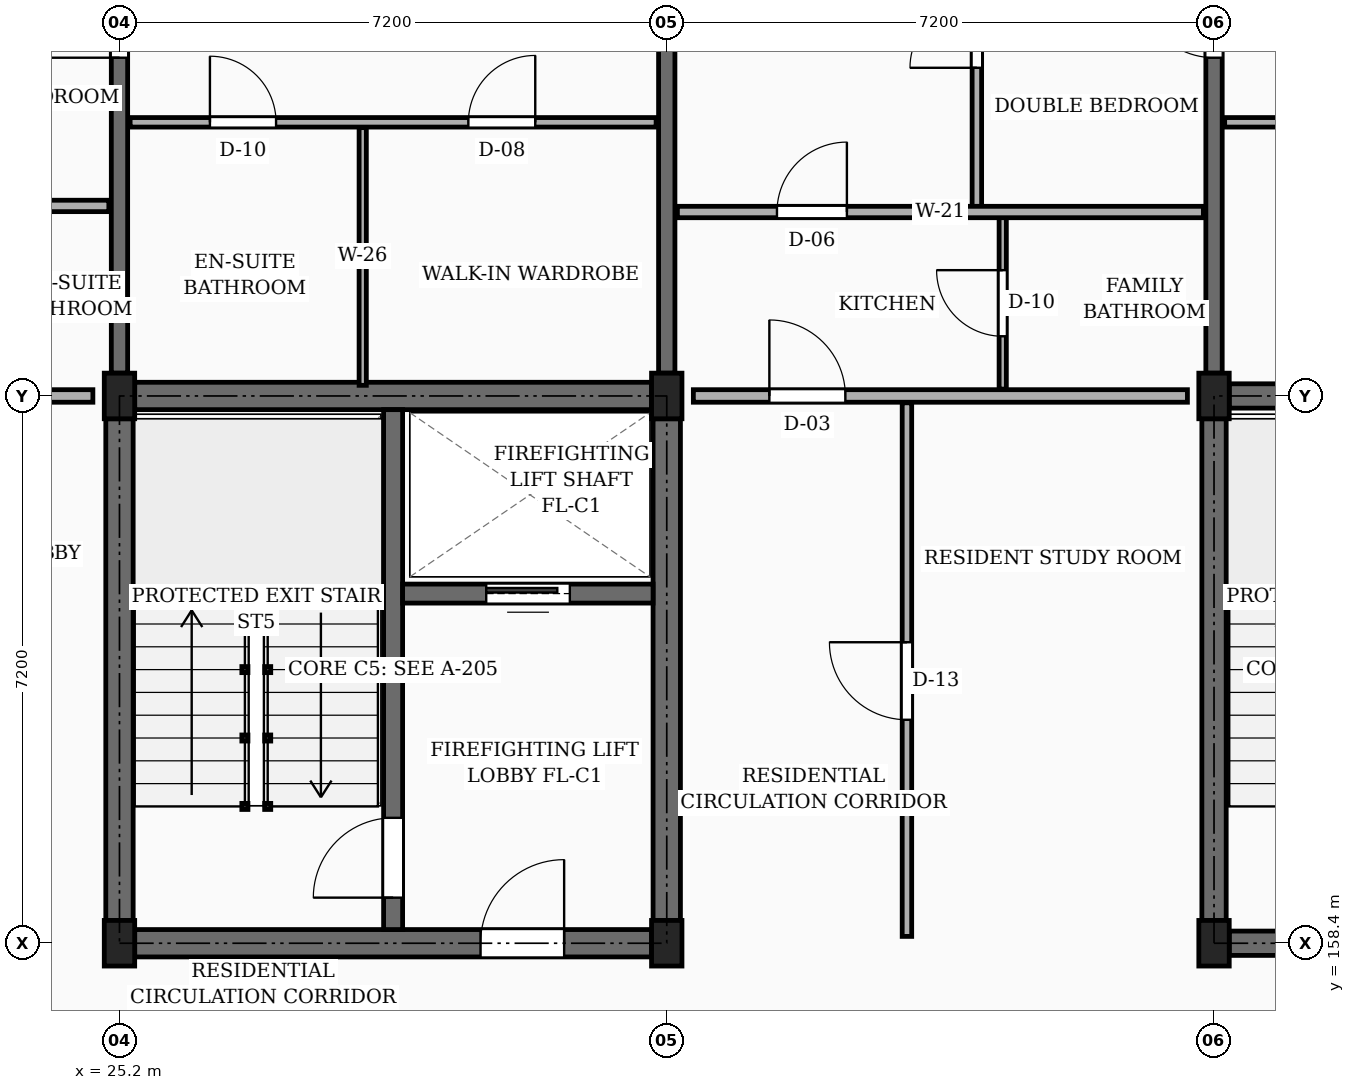
"""IFC4 building model, lengths in metres.
Left out: names, types, materials, properties, quantities, classifications, styles, units other than length and angle.
Written with IfcOpenShell. Run it as: python <this file> out.ifc"""

import sys

from ifc_helpers import new_model, si_unit, direction, frame, frame_2d, origin, origin_2d, place, context, subcontext, project, spatial, rectangle, extrude, element, fill, save


model = new_model("IFC4")
c1 = context("Model", 3, precision=1e-05, world=origin(), true_north=direction((0.0, 1.0)))
c2 = subcontext(c1, "Body", "Model", "MODEL_VIEW")
j1 = project(units=[si_unit("LENGTHUNIT", "METRE"), si_unit("PLANEANGLEUNIT", "RADIAN")], contexts=[c1])
p1 = place(None, origin())
s1 = spatial("IfcSite", under=j1, at=p1, CompositionType="ELEMENT")
p2 = place(p1, origin())
s2 = spatial("IfcBuilding", under=s1, at=p2, CompositionType="ELEMENT")
p3 = place(p2, frame((0.0, 0.0, 32.85)))
s3 = spatial("IfcBuildingStorey", under=s2, at=p3, CompositionType="ELEMENT", Elevation=32.85)
for number, where, z_axis, x_axis in (
    (1, (25.2, 158.4, 0.0), (0.0, 0.0, 1.0), (1.0, 0.0, 0.0)),
    (2, (25.2, 165.6, 0.0), (0.0, 0.0, 1.0), (1.0, 0.0, 0.0)),
    (3, (32.4, 158.4, 0.0), (0.0, 0.0, 1.0), (1.0, 0.0, 0.0)),
    (4, (32.4, 165.6, 0.0), (0.0, 0.0, 1.0), (1.0, 0.0, 0.0)),
    (5, (39.6, 158.4, 0.0), (0.0, 0.0, 1.0), (1.0, 0.0, 0.0)),
    (6, (39.6, 165.6, 0.0), (0.0, 0.0, 1.0), (1.0, 0.0, 0.0)),
):
    element("IfcColumn", number, at=place(p3, frame(where, z_axis=z_axis, x_axis=x_axis)), inside=s3, PredefinedType="COLUMN", context=c2, shape_type="SweptSolid", body=[
        extrude(rectangle(XDim=0.4, YDim=0.6, at=origin_2d()), origin(), (0.0, 0.0, 1.0), 3.15),
    ])
p4 = place(p3, frame((25.2, 165.9, 0.0), z_axis=(0.0, 0.0, 1.0), x_axis=(0.0, 1.0, 0.0)))
e7 = element("IfcWall", 7, at=p4, inside=s3, PredefinedType="SOLIDWALL", context=c2, shape_type="SweptSolid", body=[
    extrude(rectangle(XDim=6.65, YDim=0.215, at=frame_2d((3.325, 0.0))), origin(), (0.0, 0.0, 1.0), 2.185),
])
p5 = place(p4, frame((4.15, 0.0, 0.0)))
e8 = element("IfcOpeningElement", 8, at=p5, cuts=e7, PredefinedType="OPENING", context=c2, shape_type="SweptSolid", body=[
    extrude(rectangle(XDim=0.98, YDim=2.12, at=frame_2d((0.49, 1.06))), frame((0.0, 0.118, 0.0), z_axis=(0.0, -1.0, 0.0), x_axis=(1.0, 0.0, 0.0)), (0.0, 0.0, 1.0), 0.235),
])
p6 = place(p3, frame((32.4, 165.9, 0.0), z_axis=(0.0, 0.0, 1.0), x_axis=(0.0, 1.0, 0.0)))
e9 = element("IfcWall", 9, at=p6, inside=s3, PredefinedType="SOLIDWALL", context=c2, shape_type="SweptSolid", body=[
    extrude(rectangle(XDim=6.65, YDim=0.215, at=frame_2d((3.325, 0.0))), origin(), (0.0, 0.0, 1.0), 2.185),
])
p7 = place(p3, frame((39.6, 165.9, 0.0), z_axis=(0.0, 0.0, 1.0), x_axis=(0.0, 1.0, 0.0)))
e10 = element("IfcWall", 10, at=p7, inside=s3, PredefinedType="SOLIDWALL", context=c2, shape_type="SweptSolid", body=[
    extrude(rectangle(XDim=6.65, YDim=0.215, at=frame_2d((3.325, 0.0))), origin(), (0.0, 0.0, 1.0), 2.185),
])
p8 = place(p7, frame((4.15, 0.0, 0.0)))
e11 = element("IfcOpeningElement", 11, at=p8, cuts=e10, PredefinedType="OPENING", context=c2, shape_type="SweptSolid", body=[
    extrude(rectangle(XDim=0.98, YDim=2.12, at=frame_2d((0.49, 1.06))), frame((0.0, 0.118, 0.0), z_axis=(0.0, -1.0, 0.0), x_axis=(1.0, 0.0, 0.0)), (0.0, 0.0, 1.0), 0.235),
])
p9 = place(p3, frame((25.2, 158.7, 0.0), z_axis=(0.0, 0.0, 1.0), x_axis=(0.0, 1.0, 0.0)))
e12 = element("IfcWall", 12, at=p9, inside=s3, PredefinedType="SHEAR", context=c2, shape_type="SweptSolid", body=[
    extrude(rectangle(XDim=6.6, YDim=0.36, at=frame_2d((3.3, 0.0))), origin(), (0.0, 0.0, 1.0), 2.885),
])
p10 = place(p3, frame((25.4, 165.6, 0.0), z_axis=(0.0, 0.0, 1.0), x_axis=(1.0, 0.0, 0.0)))
e13 = element("IfcWall", 13, at=p10, inside=s3, PredefinedType="SHEAR", context=c2, shape_type="SweptSolid", body=[
    extrude(rectangle(XDim=6.8, YDim=0.36, at=frame_2d((3.4, 0.0))), origin(), (0.0, 0.0, 1.0), 2.885),
])
p11 = place(p3, frame((32.4, 158.7, 0.0), z_axis=(0.0, 0.0, 1.0), x_axis=(0.0, 1.0, 0.0)))
e14 = element("IfcWall", 14, at=p11, inside=s3, PredefinedType="SHEAR", context=c2, shape_type="SweptSolid", body=[
    extrude(rectangle(XDim=6.6, YDim=0.36, at=frame_2d((3.3, 0.0))), origin(), (0.0, 0.0, 1.0), 2.885),
])
p12 = place(p3, frame((25.4, 158.4, 0.0), z_axis=(0.0, 0.0, 1.0), x_axis=(1.0, 0.0, 0.0)))
e15 = element("IfcWall", 15, at=p12, inside=s3, PredefinedType="SHEAR", context=c2, shape_type="SweptSolid", body=[
    extrude(rectangle(XDim=6.8, YDim=0.36, at=frame_2d((3.4, 0.0))), origin(), (0.0, 0.0, 1.0), 2.885),
])
p13 = place(p12, frame((4.55, 0.0, 0.0)))
e16 = element("IfcOpeningElement", 16, at=p13, cuts=e15, PredefinedType="OPENING", context=c2, shape_type="SweptSolid", body=[
    extrude(rectangle(XDim=1.1, YDim=2.15, at=frame_2d((0.55, 1.075))), frame((0.0, 0.19, 0.0), z_axis=(0.0, -1.0, 0.0), x_axis=(1.0, 0.0, 0.0)), (0.0, 0.0, 1.0), 0.38),
])
p14 = place(p3, frame((28.8, 158.58, 0.0), z_axis=(0.0, 0.0, 1.0), x_axis=(0.0, 1.0, 0.0)))
e17 = element("IfcWall", 17, at=p14, inside=s3, PredefinedType="SHEAR", context=c2, shape_type="SweptSolid", body=[
    extrude(rectangle(XDim=6.84, YDim=0.25, at=frame_2d((3.42, 0.0))), origin(), (0.0, 0.0, 1.0), 2.885),
])
p15 = place(p14, frame((0.42, 0.0, 0.0)))
e18 = element("IfcOpeningElement", 18, at=p15, cuts=e17, PredefinedType="OPENING", context=c2, shape_type="SweptSolid", body=[
    extrude(rectangle(XDim=1.05, YDim=2.15, at=frame_2d((0.525, 1.075))), frame((0.0, 0.135, 0.0), z_axis=(0.0, -1.0, 0.0), x_axis=(1.0, 0.0, 0.0)), (0.0, 0.0, 1.0), 0.27),
])
p16 = place(p3, frame((28.925, 163.0, 0.0), z_axis=(0.0, 0.0, 1.0), x_axis=(1.0, 0.0, 0.0)))
e19 = element("IfcWall", 19, at=p16, inside=s3, PredefinedType="SHEAR", context=c2, shape_type="SweptSolid", body=[
    extrude(rectangle(XDim=3.295, YDim=0.25, at=frame_2d((1.647, 0.0))), origin(), (0.0, 0.0, 1.0), 2.885),
])
p17 = place(p16, frame((1.1, 0.0, 0.0)))
e20 = element("IfcOpeningElement", 20, at=p17, cuts=e19, PredefinedType="OPENING", context=c2, shape_type="SweptSolid", body=[
    extrude(rectangle(XDim=1.1, YDim=2.2, at=frame_2d((0.55, 1.1))), frame((0.0, 0.135, 0.0), z_axis=(0.0, -1.0, 0.0), x_axis=(1.0, 0.0, 0.0)), (0.0, 0.0, 1.0), 0.27),
])
p18 = place(p3, frame((39.6, 158.7, 0.0), z_axis=(0.0, 0.0, 1.0), x_axis=(0.0, 1.0, 0.0)))
e21 = element("IfcWall", 21, at=p18, inside=s3, PredefinedType="SHEAR", context=c2, shape_type="SweptSolid", body=[
    extrude(rectangle(XDim=6.6, YDim=0.32, at=frame_2d((3.3, 0.0))), origin(), (0.0, 0.0, 1.0), 2.885),
])
p19 = place(p3, frame((39.8, 165.6, 0.0), z_axis=(0.0, 0.0, 1.0), x_axis=(1.0, 0.0, 0.0)))
e22 = element("IfcWall", 22, at=p19, inside=s3, PredefinedType="SHEAR", context=c2, shape_type="SweptSolid", body=[
    extrude(rectangle(XDim=6.8, YDim=0.32, at=frame_2d((3.4, 0.0))), origin(), (0.0, 0.0, 1.0), 2.885),
])
p20 = place(p3, frame((39.8, 158.4, 0.0), z_axis=(0.0, 0.0, 1.0), x_axis=(1.0, 0.0, 0.0)))
e23 = element("IfcWall", 23, at=p20, inside=s3, PredefinedType="SHEAR", context=c2, shape_type="SweptSolid", body=[
    extrude(rectangle(XDim=6.8, YDim=0.32, at=frame_2d((3.4, 0.0))), origin(), (0.0, 0.0, 1.0), 2.885),
])
p21 = place(p20, frame((4.55, 0.0, 0.0)))
e24 = element("IfcOpeningElement", 24, at=p21, cuts=e23, PredefinedType="OPENING", context=c2, shape_type="SweptSolid", body=[
    extrude(rectangle(XDim=1.1, YDim=2.15, at=frame_2d((0.55, 1.075))), frame((0.0, 0.17, 0.0), z_axis=(0.0, -1.0, 0.0), x_axis=(1.0, 0.0, 0.0)), (0.0, 0.0, 1.0), 0.34),
])
p22 = place(p3, frame((18.35, 165.6, 0.0), z_axis=(0.0, 0.0, 1.0), x_axis=(1.0, 0.0, 0.0)))
e25 = element("IfcWall", 25, at=p22, inside=s3, PredefinedType="PARTITIONING", context=c2, shape_type="SweptSolid", body=[
    extrude(rectangle(XDim=6.5, YDim=0.165, at=frame_2d((3.25, 0.0))), origin(), (0.0, 0.0, 1.0), 2.32),
])
p23 = place(p22, frame((1.0, 0.0, 0.0)))
e26 = element("IfcOpeningElement", 26, at=p23, cuts=e25, PredefinedType="OPENING", context=c2, shape_type="SweptSolid", body=[
    extrude(rectangle(XDim=1.14, YDim=2.18, at=frame_2d((0.57, 1.09))), frame((0.0, 0.093, 0.0), z_axis=(0.0, -1.0, 0.0), x_axis=(1.0, 0.0, 0.0)), (0.0, 0.0, 1.0), 0.185),
])
p24 = place(p3, frame((32.75, 165.6, 0.0), z_axis=(0.0, 0.0, 1.0), x_axis=(1.0, 0.0, 0.0)))
e27 = element("IfcWall", 27, at=p24, inside=s3, PredefinedType="PARTITIONING", context=c2, shape_type="SweptSolid", body=[
    extrude(rectangle(XDim=6.5, YDim=0.165, at=frame_2d((3.25, 0.0))), origin(), (0.0, 0.0, 1.0), 2.32),
])
p25 = place(p24, frame((1.0, 0.0, 0.0)))
e28 = element("IfcOpeningElement", 28, at=p25, cuts=e27, PredefinedType="OPENING", context=c2, shape_type="SweptSolid", body=[
    extrude(rectangle(XDim=1.0, YDim=2.15, at=frame_2d((0.5, 1.075))), frame((0.0, 0.093, 0.0), z_axis=(0.0, -1.0, 0.0), x_axis=(1.0, 0.0, 0.0)), (0.0, 0.0, 1.0), 0.185),
])
p26 = place(p3, frame((18.14, 168.1, 0.0), z_axis=(0.0, 0.0, 1.0), x_axis=(1.0, 0.0, 0.0)))
e29 = element("IfcWall", 29, at=p26, inside=s3, PredefinedType="PARTITIONING", context=c2, shape_type="SweptSolid", body=[
    extrude(rectangle(XDim=6.92, YDim=0.15, at=frame_2d((3.46, 0.0))), origin(), (0.0, 0.0, 1.0), 2.32),
])
p27 = place(p26, frame((1.31, 0.0, 0.0)))
e30 = element("IfcOpeningElement", 30, at=p27, cuts=e29, PredefinedType="OPENING", context=c2, shape_type="SweptSolid", body=[
    extrude(rectangle(XDim=0.95, YDim=2.1, at=frame_2d((0.475, 1.05))), frame((0.0, 0.085, 0.0), z_axis=(0.0, -1.0, 0.0), x_axis=(1.0, 0.0, 0.0)), (0.0, 0.0, 1.0), 0.17),
])
p28 = place(p3, frame((25.34, 169.2, 0.0), z_axis=(0.0, 0.0, 1.0), x_axis=(1.0, 0.0, 0.0)))
e31 = element("IfcWall", 31, at=p28, inside=s3, PredefinedType="PARTITIONING", context=c2, shape_type="SweptSolid", body=[
    extrude(rectangle(XDim=6.92, YDim=0.125, at=frame_2d((3.46, 0.0))), origin(), (0.0, 0.0, 1.0), 2.32),
])
p29 = place(p28, frame((1.05, 0.0, 0.0)))
e32 = element("IfcOpeningElement", 32, at=p29, cuts=e31, PredefinedType="OPENING", context=c2, shape_type="SweptSolid", body=[
    extrude(rectangle(XDim=0.87, YDim=2.05, at=frame_2d((0.435, 1.025))), frame((0.0, 0.073, 0.0), z_axis=(0.0, -1.0, 0.0), x_axis=(1.0, 0.0, 0.0)), (0.0, 0.0, 1.0), 0.145),
])
p30 = place(p28, frame((4.45, 0.0, 0.0)))
e33 = element("IfcOpeningElement", 33, at=p30, cuts=e31, PredefinedType="OPENING", context=c2, shape_type="SweptSolid", body=[
    extrude(rectangle(XDim=0.88, YDim=2.08, at=frame_2d((0.44, 1.04))), frame((0.0, 0.073, 0.0), z_axis=(0.0, -1.0, 0.0), x_axis=(1.0, 0.0, 0.0)), (0.0, 0.0, 1.0), 0.145),
])
p31 = place(p3, frame((28.4, 165.74, 0.0), z_axis=(0.0, 0.0, 1.0), x_axis=(0.0, 1.0, 0.0)))
e34 = element("IfcWall", 34, at=p31, inside=s3, PredefinedType="PARTITIONING", context=c2, shape_type="SweptSolid", body=[
    extrude(rectangle(XDim=3.39, YDim=0.095, at=frame_2d((1.695, 0.0))), origin(), (0.0, 0.0, 1.0), 2.32),
])
p32 = place(p3, frame((35.56, 158.49, 0.0), z_axis=(0.0, 0.0, 1.0), x_axis=(0.0, 1.0, 0.0)))
e35 = element("IfcWall", 35, at=p32, inside=s3, PredefinedType="PARTITIONING", context=c2, shape_type="SweptSolid", body=[
    extrude(rectangle(XDim=7.02, YDim=0.125, at=frame_2d((3.51, 0.0))), origin(), (0.0, 0.0, 1.0), 2.32),
])
p33 = place(p32, frame((2.85, 0.0, 0.0)))
e36 = element("IfcOpeningElement", 36, at=p33, cuts=e35, PredefinedType="OPENING", context=c2, shape_type="SweptSolid", body=[
    extrude(rectangle(XDim=1.02, YDim=2.15, at=frame_2d((0.51, 1.075))), frame((0.0, 0.073, 0.0), z_axis=(0.0, -1.0, 0.0), x_axis=(1.0, 0.0, 0.0)), (0.0, 0.0, 1.0), 0.145),
])
p34 = place(p3, frame((36.48, 168.09, 0.0), z_axis=(0.0, 0.0, 1.0), x_axis=(0.0, 1.0, 0.0)))
e37 = element("IfcWall", 37, at=p34, inside=s3, PredefinedType="PARTITIONING", context=c2, shape_type="SweptSolid", body=[
    extrude(rectangle(XDim=4.535, YDim=0.125, at=frame_2d((2.268, 0.0))), origin(), (0.0, 0.0, 1.0), 2.32),
])
p35 = place(p34, frame((1.827, 0.0, 0.0)))
e38 = element("IfcOpeningElement", 38, at=p35, cuts=e37, PredefinedType="OPENING", context=c2, shape_type="SweptSolid", body=[
    extrude(rectangle(XDim=0.88, YDim=2.08, at=frame_2d((0.44, 1.04))), frame((0.0, 0.073, 0.0), z_axis=(0.0, -1.0, 0.0), x_axis=(1.0, 0.0, 0.0)), (0.0, 0.0, 1.0), 0.145),
])
p36 = place(p3, frame((36.82, 165.69, 0.0), z_axis=(0.0, 0.0, 1.0), x_axis=(0.0, 1.0, 0.0)))
e39 = element("IfcWall", 39, at=p36, inside=s3, PredefinedType="PARTITIONING", context=c2, shape_type="SweptSolid", body=[
    extrude(rectangle(XDim=2.26, YDim=0.095, at=frame_2d((1.13, 0.0))), origin(), (0.0, 0.0, 1.0), 2.32),
])
p37 = place(p36, frame((0.695, 0.0, 0.0)))
e40 = element("IfcOpeningElement", 40, at=p37, cuts=e39, PredefinedType="OPENING", context=c2, shape_type="SweptSolid", body=[
    extrude(rectangle(XDim=0.87, YDim=2.05, at=frame_2d((0.435, 1.025))), frame((0.0, 0.058, 0.0), z_axis=(0.0, -1.0, 0.0), x_axis=(1.0, 0.0, 0.0)), (0.0, 0.0, 1.0), 0.115),
])
p38 = place(p3, frame((32.54, 168.02, 0.0), z_axis=(0.0, 0.0, 1.0), x_axis=(1.0, 0.0, 0.0)))
e41 = element("IfcWall", 41, at=p38, inside=s3, PredefinedType="PARTITIONING", context=c2, shape_type="SweptSolid", body=[
    extrude(rectangle(XDim=6.92, YDim=0.15, at=frame_2d((3.46, 0.0))), origin(), (0.0, 0.0, 1.0), 2.32),
])
p39 = place(p38, frame((1.31, 0.0, 0.0)))
e42 = element("IfcOpeningElement", 42, at=p39, cuts=e41, PredefinedType="OPENING", context=c2, shape_type="SweptSolid", body=[
    extrude(rectangle(XDim=0.92, YDim=2.1, at=frame_2d((0.46, 1.05))), frame((0.0, 0.085, 0.0), z_axis=(0.0, -1.0, 0.0), x_axis=(1.0, 0.0, 0.0)), (0.0, 0.0, 1.0), 0.17),
])
p40 = place(p3, frame((39.74, 169.2, 0.0), z_axis=(0.0, 0.0, 1.0), x_axis=(1.0, 0.0, 0.0)))
e43 = element("IfcWall", 43, at=p40, inside=s3, PredefinedType="PARTITIONING", context=c2, shape_type="SweptSolid", body=[
    extrude(rectangle(XDim=6.92, YDim=0.125, at=frame_2d((3.46, 0.0))), origin(), (0.0, 0.0, 1.0), 2.32),
])
p41 = place(p40, frame((1.05, 0.0, 0.0)))
e44 = element("IfcOpeningElement", 44, at=p41, cuts=e43, PredefinedType="OPENING", context=c2, shape_type="SweptSolid", body=[
    extrude(rectangle(XDim=0.87, YDim=2.05, at=frame_2d((0.435, 1.025))), frame((0.0, 0.073, 0.0), z_axis=(0.0, -1.0, 0.0), x_axis=(1.0, 0.0, 0.0)), (0.0, 0.0, 1.0), 0.145),
])
p42 = place(p40, frame((4.45, 0.0, 0.0)))
e45 = element("IfcOpeningElement", 45, at=p42, cuts=e43, PredefinedType="OPENING", context=c2, shape_type="SweptSolid", body=[
    extrude(rectangle(XDim=0.88, YDim=2.08, at=frame_2d((0.44, 1.04))), frame((0.0, 0.073, 0.0), z_axis=(0.0, -1.0, 0.0), x_axis=(1.0, 0.0, 0.0)), (0.0, 0.0, 1.0), 0.145),
])
p43 = place(p13, frame((1.1, 0.0, 0.0), z_axis=(0.0, 0.0, 1.0), x_axis=(-1.0, 0.0, 0.0)))
e46 = element("IfcDoor", 46, at=p43, inside=s3, OperationType="SINGLE_SWING_RIGHT", PredefinedType="DOOR", context=c2, shape_type="SweptSolid", body=[
    extrude(rectangle(XDim=1.1, YDim=2.15, at=frame_2d((0.55, 1.075))), frame((0.0, 0.025, 0.0), z_axis=(0.0, -1.0, 0.0), x_axis=(1.0, 0.0, 0.0)), (0.0, 0.0, 1.0), 0.05),
])
fill(e16, e46)
p44 = place(p15, origin())
e47 = element("IfcDoor", 47, at=p44, inside=s3, OperationType="SINGLE_SWING_LEFT", PredefinedType="DOOR", context=c2, shape_type="SweptSolid", body=[
    extrude(rectangle(XDim=1.05, YDim=2.15, at=frame_2d((0.525, 1.075))), frame((0.0, 0.025, 0.0), z_axis=(0.0, -1.0, 0.0), x_axis=(1.0, 0.0, 0.0)), (0.0, 0.0, 1.0), 0.05),
])
fill(e18, e47)
p45 = place(p17, origin())
e48 = element("IfcDoor", 48, at=p45, inside=s3, OperationType="SLIDING_TO_LEFT", PredefinedType="DOOR", context=c2, shape_type="SweptSolid", body=[
    extrude(rectangle(XDim=1.1, YDim=2.2, at=frame_2d((0.55, 1.1))), frame((0.0, 0.025, 0.0), z_axis=(0.0, -1.0, 0.0), x_axis=(1.0, 0.0, 0.0)), (0.0, 0.0, 1.0), 0.05),
])
fill(e20, e48)
p46 = place(p25, origin())
e49 = element("IfcDoor", 49, at=p46, inside=s3, OperationType="SINGLE_SWING_LEFT", PredefinedType="DOOR", context=c2, shape_type="SweptSolid", body=[
    extrude(rectangle(XDim=1.0, YDim=2.15, at=frame_2d((0.5, 1.075))), frame((0.0, 0.025, 0.0), z_axis=(0.0, -1.0, 0.0), x_axis=(1.0, 0.0, 0.0)), (0.0, 0.0, 1.0), 0.05),
])
fill(e28, e49)
p47 = place(p29, origin())
e50 = element("IfcDoor", 50, at=p47, inside=s3, OperationType="SINGLE_SWING_LEFT", PredefinedType="DOOR", context=c2, shape_type="SweptSolid", body=[
    extrude(rectangle(XDim=0.87, YDim=2.05, at=frame_2d((0.435, 1.025))), frame((0.0, 0.025, 0.0), z_axis=(0.0, -1.0, 0.0), x_axis=(1.0, 0.0, 0.0)), (0.0, 0.0, 1.0), 0.05),
])
fill(e32, e50)
p48 = place(p30, origin())
e51 = element("IfcDoor", 51, at=p48, inside=s3, OperationType="SINGLE_SWING_RIGHT", PredefinedType="DOOR", context=c2, shape_type="SweptSolid", body=[
    extrude(rectangle(XDim=0.88, YDim=2.08, at=frame_2d((0.44, 1.04))), frame((0.0, 0.025, 0.0), z_axis=(0.0, -1.0, 0.0), x_axis=(1.0, 0.0, 0.0)), (0.0, 0.0, 1.0), 0.05),
])
fill(e33, e51)
p49 = place(p33, origin())
e52 = element("IfcDoor", 52, at=p49, inside=s3, OperationType="SINGLE_SWING_RIGHT", PredefinedType="DOOR", context=c2, shape_type="SweptSolid", body=[
    extrude(rectangle(XDim=1.02, YDim=2.15, at=frame_2d((0.51, 1.075))), frame((0.0, 0.025, 0.0), z_axis=(0.0, -1.0, 0.0), x_axis=(1.0, 0.0, 0.0)), (0.0, 0.0, 1.0), 0.05),
])
fill(e36, e52)
p50 = place(p35, origin())
e53 = element("IfcDoor", 53, at=p50, inside=s3, OperationType="SINGLE_SWING_LEFT", PredefinedType="DOOR", context=c2, shape_type="SweptSolid", body=[
    extrude(rectangle(XDim=0.88, YDim=2.08, at=frame_2d((0.44, 1.04))), frame((0.0, 0.025, 0.0), z_axis=(0.0, -1.0, 0.0), x_axis=(1.0, 0.0, 0.0)), (0.0, 0.0, 1.0), 0.05),
])
fill(e38, e53)
p51 = place(p37, origin())
e54 = element("IfcDoor", 54, at=p51, inside=s3, OperationType="SINGLE_SWING_RIGHT", PredefinedType="DOOR", context=c2, shape_type="SweptSolid", body=[
    extrude(rectangle(XDim=0.87, YDim=2.05, at=frame_2d((0.435, 1.025))), frame((0.0, 0.025, 0.0), z_axis=(0.0, -1.0, 0.0), x_axis=(1.0, 0.0, 0.0)), (0.0, 0.0, 1.0), 0.05),
])
fill(e40, e54)
p52 = place(p39, origin())
e55 = element("IfcDoor", 55, at=p52, inside=s3, OperationType="SINGLE_SWING_RIGHT", PredefinedType="DOOR", context=c2, shape_type="SweptSolid", body=[
    extrude(rectangle(XDim=0.92, YDim=2.1, at=frame_2d((0.46, 1.05))), frame((0.0, 0.025, 0.0), z_axis=(0.0, -1.0, 0.0), x_axis=(1.0, 0.0, 0.0)), (0.0, 0.0, 1.0), 0.05),
])
fill(e42, e55)
p53 = place(p5, origin())
e56 = element("IfcDoor", 56, at=p53, inside=s3, OperationType="SINGLE_SWING_LEFT", PredefinedType="DOOR", context=c2, shape_type="SweptSolid", body=[
    extrude(rectangle(XDim=0.98, YDim=2.12, at=frame_2d((0.49, 1.06))), frame((0.0, 0.025, 0.0), z_axis=(0.0, -1.0, 0.0), x_axis=(1.0, 0.0, 0.0)), (0.0, 0.0, 1.0), 0.05),
])
fill(e8, e56)
p54 = place(p8, origin())
e57 = element("IfcDoor", 57, at=p54, inside=s3, OperationType="SINGLE_SWING_RIGHT", PredefinedType="DOOR", context=c2, shape_type="SweptSolid", body=[
    extrude(rectangle(XDim=0.98, YDim=2.12, at=frame_2d((0.49, 1.06))), frame((0.0, 0.025, 0.0), z_axis=(0.0, -1.0, 0.0), x_axis=(1.0, 0.0, 0.0)), (0.0, 0.0, 1.0), 0.05),
])
fill(e11, e57)
save(model, sys.argv[1])
